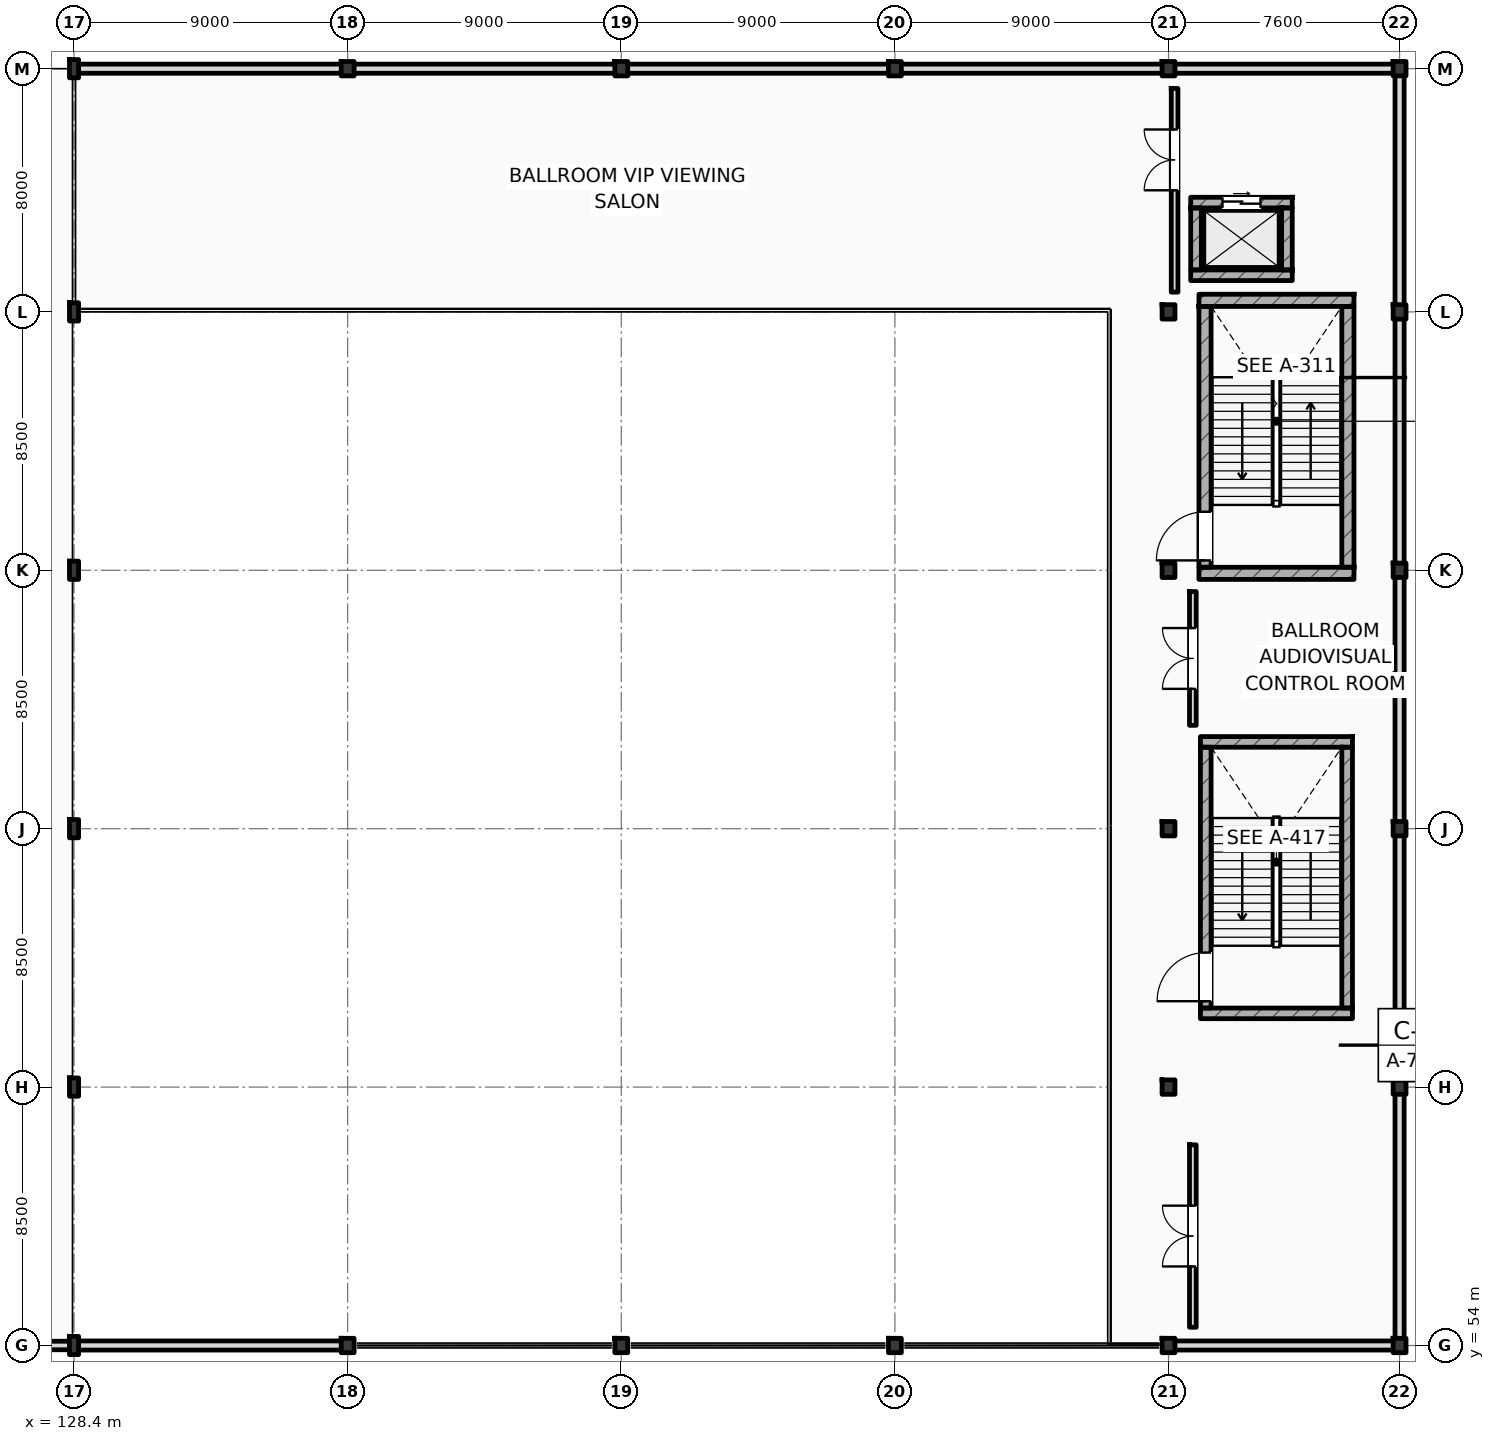
"""IFC4 building model, lengths in metres.
Left out: names, types, materials, properties, quantities, classifications, styles, units other than length and angle.
Written with IfcOpenShell. Run it as: python <this file> out.ifc"""

import sys

from ifc_helpers import new_model, si_unit, direction, frame, frame_2d, origin, origin_2d, place, context, subcontext, project, spatial, rectangle, i_section, extrude, element, fill, save


model = new_model("IFC4")
c1 = context("Model", 3, precision=1e-05, world=origin(), true_north=direction((0.0, 1.0)))
c2 = subcontext(c1, "Body", "Model", "MODEL_VIEW")
j1 = project(units=[si_unit("LENGTHUNIT", "METRE"), si_unit("PLANEANGLEUNIT", "RADIAN")], contexts=[c1])
p1 = place(None, origin())
s1 = spatial("IfcSite", under=j1, at=p1, CompositionType="ELEMENT")
p2 = place(p1, origin())
s2 = spatial("IfcBuilding", under=s1, at=p2, CompositionType="ELEMENT")
p3 = place(p2, frame((0.0, 0.0, 6.0)))
s3 = spatial("IfcBuildingStorey", under=s2, at=p3, CompositionType="ELEMENT", Elevation=6.0)
for number, where, z_axis, x_axis in (
    (1, (128.4, 54.0, 0.0), (0.0, 0.0, 1.0), (1.0, 0.0, 0.0)),
    (2, (128.4, 62.5, 0.0), (0.0, 0.0, 1.0), (1.0, 0.0, 0.0)),
    (3, (128.4, 71.0, 0.0), (0.0, 0.0, 1.0), (1.0, 0.0, 0.0)),
    (4, (128.4, 79.5, 0.0), (0.0, 0.0, 1.0), (1.0, 0.0, 0.0)),
    (5, (128.4, 88.0, 0.0), (0.0, 0.0, 1.0), (1.0, 0.0, 0.0)),
    (6, (128.4, 96.0, 0.0), (0.0, 0.0, 1.0), (1.0, 0.0, 0.0)),
):
    element("IfcColumn", number, at=place(p3, frame(where, z_axis=z_axis, x_axis=x_axis)), inside=s3, PredefinedType="COLUMN", context=c2, shape_type="SweptSolid", body=[
        extrude(i_section(OverallWidth=0.3, OverallDepth=0.6, WebThickness=0.015, FlangeThickness=0.03, FilletRadius=0.027, at=origin_2d()), origin(), (0.0, 0.0, 1.0), 5.4),
    ])
for number, where, z_axis, x_axis in (
    (7, (164.4, 54.0, 0.0), (0.0, 0.0, 1.0), (1.0, 0.0, 0.0)),
    (8, (164.4, 62.5, 0.0), (0.0, 0.0, 1.0), (1.0, 0.0, 0.0)),
    (9, (164.4, 71.0, 0.0), (0.0, 0.0, 1.0), (1.0, 0.0, 0.0)),
    (10, (164.4, 79.5, 0.0), (0.0, 0.0, 1.0), (1.0, 0.0, 0.0)),
    (11, (164.4, 88.0, 0.0), (0.0, 0.0, 1.0), (1.0, 0.0, 0.0)),
    (12, (164.4, 96.0, 0.0), (0.0, 0.0, 1.0), (1.0, 0.0, 0.0)),
    (13, (172.0, 54.0, 0.0), (0.0, 0.0, 1.0), (1.0, 0.0, 0.0)),
    (14, (172.0, 62.5, 0.0), (0.0, 0.0, 1.0), (1.0, 0.0, 0.0)),
    (15, (172.0, 71.0, 0.0), (0.0, 0.0, 1.0), (1.0, 0.0, 0.0)),
    (16, (172.0, 79.5, 0.0), (0.0, 0.0, 1.0), (1.0, 0.0, 0.0)),
    (17, (172.0, 88.0, 0.0), (0.0, 0.0, 1.0), (1.0, 0.0, 0.0)),
    (18, (172.0, 96.0, 0.0), (0.0, 0.0, 1.0), (1.0, 0.0, 0.0)),
    (19, (137.4, 54.0, 0.0), (0.0, 0.0, 1.0), (1.0, 0.0, 0.0)),
    (20, (137.4, 96.0, 0.0), (0.0, 0.0, 1.0), (1.0, 0.0, 0.0)),
    (21, (146.4, 54.0, 0.0), (0.0, 0.0, 1.0), (1.0, 0.0, 0.0)),
    (22, (146.4, 96.0, 0.0), (0.0, 0.0, 1.0), (1.0, 0.0, 0.0)),
    (23, (155.4, 54.0, 0.0), (0.0, 0.0, 1.0), (1.0, 0.0, 0.0)),
    (24, (155.4, 96.0, 0.0), (0.0, 0.0, 1.0), (1.0, 0.0, 0.0)),
):
    element("IfcColumn", number, at=place(p3, frame(where, z_axis=z_axis, x_axis=x_axis)), inside=s3, PredefinedType="COLUMN", context=c2, shape_type="SweptSolid", body=[
        extrude(i_section(OverallWidth=0.424, OverallDepth=0.474, WebThickness=0.045, FlangeThickness=0.055, FilletRadius=0.015, at=origin_2d()), origin(), (0.0, 0.0, 1.0), 5.4),
    ])
for number, where, z_axis, x_axis in (
    (25, (165.4, 88.38, 0.0), (0.0, 0.0, 1.0), (1.0, 0.0, 0.0)),
    (26, (165.4, 79.4, 0.0), (0.0, 0.0, 1.0), (1.0, 0.0, 0.0)),
):
    element("IfcWall", number, at=place(p3, frame(where, z_axis=z_axis, x_axis=x_axis)), inside=s3, PredefinedType="SHEAR", context=c2, shape_type="SweptSolid", body=[
        extrude(rectangle(XDim=5.1, YDim=0.4, at=frame_2d((2.55, 0.0))), origin(), (0.0, 0.0, 1.0), 5.4),
    ])
p4 = place(p3, frame((165.6, 79.6, 0.0), z_axis=(0.0, 0.0, 1.0), x_axis=(0.0, 1.0, 0.0)))
e27 = element("IfcWall", 27, at=p4, inside=s3, PredefinedType="SHEAR", context=c2, shape_type="SweptSolid", body=[
    extrude(rectangle(XDim=8.58, YDim=0.4, at=frame_2d((4.29, 0.0))), origin(), (0.0, 0.0, 1.0), 5.4),
])
p5 = place(p4, frame((0.225, 0.0, 0.0)))
e28 = element("IfcOpeningElement", 28, at=p5, cuts=e27, PredefinedType="OPENING", context=c2, shape_type="SweptSolid", body=[
    extrude(rectangle(XDim=1.6, YDim=2.2, at=frame_2d((0.8, 1.1))), frame((0.0, 0.21, 0.0), z_axis=(0.0, -1.0, 0.0), x_axis=(1.0, 0.0, 0.0)), (0.0, 0.0, 1.0), 0.42),
])
p6 = place(p3, frame((170.3, 79.6, 0.0), z_axis=(0.0, 0.0, 1.0), x_axis=(0.0, 1.0, 0.0)))
e29 = element("IfcWall", 29, at=p6, inside=s3, PredefinedType="SHEAR", context=c2, shape_type="SweptSolid", body=[
    extrude(rectangle(XDim=8.58, YDim=0.4, at=frame_2d((4.29, 0.0))), origin(), (0.0, 0.0, 1.0), 5.4),
])
for number, where, z_axis, x_axis in (
    (30, (165.45, 73.855, 0.0), (0.0, 0.0, 1.0), (1.0, 0.0, 0.0)),
    (31, (165.45, 64.925, 0.0), (0.0, 0.0, 1.0), (1.0, 0.0, 0.0)),
):
    element("IfcWall", number, at=place(p3, frame(where, z_axis=z_axis, x_axis=x_axis)), inside=s3, PredefinedType="SHEAR", context=c2, shape_type="SweptSolid", body=[
        extrude(rectangle(XDim=5.0, YDim=0.35, at=frame_2d((2.5, 0.0))), origin(), (0.0, 0.0, 1.0), 5.4),
    ])
p7 = place(p3, frame((165.625, 65.1, 0.0), z_axis=(0.0, 0.0, 1.0), x_axis=(0.0, 1.0, 0.0)))
e32 = element("IfcWall", 32, at=p7, inside=s3, PredefinedType="SHEAR", context=c2, shape_type="SweptSolid", body=[
    extrude(rectangle(XDim=8.58, YDim=0.35, at=frame_2d((4.29, 0.0))), origin(), (0.0, 0.0, 1.0), 5.4),
])
p8 = place(p7, frame((0.225, 0.0, 0.0)))
e33 = element("IfcOpeningElement", 33, at=p8, cuts=e32, PredefinedType="OPENING", context=c2, shape_type="SweptSolid", body=[
    extrude(rectangle(XDim=1.6, YDim=2.2, at=frame_2d((0.8, 1.1))), frame((0.0, 0.185, 0.0), z_axis=(0.0, -1.0, 0.0), x_axis=(1.0, 0.0, 0.0)), (0.0, 0.0, 1.0), 0.37),
])
p9 = place(p3, frame((170.275, 65.1, 0.0), z_axis=(0.0, 0.0, 1.0), x_axis=(0.0, 1.0, 0.0)))
e34 = element("IfcWall", 34, at=p9, inside=s3, PredefinedType="SHEAR", context=c2, shape_type="SweptSolid", body=[
    extrude(rectangle(XDim=8.58, YDim=0.35, at=frame_2d((4.29, 0.0))), origin(), (0.0, 0.0, 1.0), 5.4),
])
p10 = place(p3, frame((103.2, 54.0, 0.0), z_axis=(0.0, 0.0, 1.0), x_axis=(1.0, 0.0, 0.0)))
e35 = element("IfcWall", 35, at=p10, inside=s3, PredefinedType="STANDARD", context=c2, shape_type="SweptSolid", body=[
    extrude(rectangle(XDim=25.2, YDim=0.28, at=frame_2d((12.6, 0.0))), origin(), (0.0, 0.0, 1.0), 4.49),
])
p11 = place(p3, frame((128.4, 54.0, 0.0), z_axis=(0.0, 0.0, 1.0), x_axis=(1.0, 0.0, 0.0)))
e36 = element("IfcWall", 36, at=p11, inside=s3, PredefinedType="STANDARD", context=c2, shape_type="SweptSolid", body=[
    extrude(rectangle(XDim=9.0, YDim=0.3, at=frame_2d((4.5, 0.0))), origin(), (0.0, 0.0, 1.0), 4.44),
])
for number, where, z_axis, x_axis in (
    (37, (128.4, 96.0, 0.0), (0.0, 0.0, 1.0), (1.0, 0.0, 0.0)),
    (38, (137.4, 96.0, 0.0), (0.0, 0.0, 1.0), (1.0, 0.0, 0.0)),
    (39, (146.4, 96.0, 0.0), (0.0, 0.0, 1.0), (1.0, 0.0, 0.0)),
    (40, (155.4, 96.0, 0.0), (0.0, 0.0, 1.0), (1.0, 0.0, 0.0)),
):
    element("IfcWall", number, at=place(p3, frame(where, z_axis=z_axis, x_axis=x_axis)), inside=s3, PredefinedType="STANDARD", context=c2, shape_type="SweptSolid", body=[
        extrude(rectangle(XDim=9.0, YDim=0.3, at=frame_2d((4.5, 0.0))), origin(), (0.0, 0.0, 1.0), 4.57),
    ])
p12 = place(p3, frame((164.4, 54.0, 0.0), z_axis=(0.0, 0.0, 1.0), x_axis=(1.0, 0.0, 0.0)))
e41 = element("IfcWall", 41, at=p12, inside=s3, PredefinedType="STANDARD", context=c2, shape_type="SweptSolid", body=[
    extrude(rectangle(XDim=7.6, YDim=0.3, at=frame_2d((3.8, 0.0))), origin(), (0.0, 0.0, 1.0), 4.54),
])
p13 = place(p3, frame((164.4, 96.0, 0.0), z_axis=(0.0, 0.0, 1.0), x_axis=(1.0, 0.0, 0.0)))
e42 = element("IfcWall", 42, at=p13, inside=s3, PredefinedType="STANDARD", context=c2, shape_type="SweptSolid", body=[
    extrude(rectangle(XDim=7.6, YDim=0.3, at=frame_2d((3.8, 0.0))), origin(), (0.0, 0.0, 1.0), 4.67),
])
p14 = place(p3, frame((172.0, 54.0, 0.0), z_axis=(0.0, 0.0, 1.0), x_axis=(0.0, 1.0, 0.0)))
e43 = element("IfcWall", 43, at=p14, inside=s3, PredefinedType="STANDARD", context=c2, shape_type="SweptSolid", body=[
    extrude(rectangle(XDim=17.0, YDim=0.3, at=frame_2d((8.5, 0.0))), origin(), (0.0, 0.0, 1.0), 4.58),
])
for number, where, z_axis, x_axis in (
    (44, (172.0, 71.0, 0.0), (0.0, 0.0, 1.0), (0.0, 1.0, 0.0)),
    (45, (172.0, 79.5, 0.0), (0.0, 0.0, 1.0), (0.0, 1.0, 0.0)),
):
    element("IfcWall", number, at=place(p3, frame(where, z_axis=z_axis, x_axis=x_axis)), inside=s3, PredefinedType="STANDARD", context=c2, shape_type="SweptSolid", body=[
        extrude(rectangle(XDim=8.5, YDim=0.3, at=frame_2d((4.25, 0.0))), origin(), (0.0, 0.0, 1.0), 4.68),
    ])
p15 = place(p3, frame((172.0, 88.0, 0.0), z_axis=(0.0, 0.0, 1.0), x_axis=(0.0, 1.0, 0.0)))
e46 = element("IfcWall", 46, at=p15, inside=s3, PredefinedType="STANDARD", context=c2, shape_type="SweptSolid", body=[
    extrude(rectangle(XDim=8.0, YDim=0.3, at=frame_2d((4.0, 0.0))), origin(), (0.0, 0.0, 1.0), 4.72),
])
p16 = place(p3, frame((165.13, 91.595, 0.0), z_axis=(0.0, 0.0, 1.0), x_axis=(1.0, 0.0, 0.0)))
e47 = element("IfcWall", 47, at=p16, inside=s3, PredefinedType="SHEAR", context=c2, shape_type="SweptSolid", body=[
    extrude(rectangle(XDim=3.34, YDim=0.35, at=frame_2d((1.67, 0.0))), origin(), (0.0, 0.0, 1.0), 5.05),
])
p17 = place(p16, frame((1.045, 0.0, 0.0)))
e48 = element("IfcOpeningElement", 48, at=p17, cuts=e47, PredefinedType="OPENING", context=c2, shape_type="SweptSolid", body=[
    extrude(rectangle(XDim=1.25, YDim=2.25, at=frame_2d((0.625, 1.125))), frame((0.0, 0.185, 0.0), z_axis=(0.0, -1.0, 0.0), x_axis=(1.0, 0.0, 0.0)), (0.0, 0.0, 1.0), 0.37),
])
p18 = place(p3, frame((165.13, 89.205, 0.0), z_axis=(0.0, 0.0, 1.0), x_axis=(1.0, 0.0, 0.0)))
e49 = element("IfcWall", 49, at=p18, inside=s3, PredefinedType="SHEAR", context=c2, shape_type="SweptSolid", body=[
    extrude(rectangle(XDim=3.34, YDim=0.35, at=frame_2d((1.67, 0.0))), origin(), (0.0, 0.0, 1.0), 5.05),
])
for number, where, z_axis, x_axis in (
    (50, (165.305, 89.38, 0.0), (0.0, 0.0, 1.0), (0.0, 1.0, 0.0)),
    (51, (168.295, 89.38, 0.0), (0.0, 0.0, 1.0), (0.0, 1.0, 0.0)),
):
    element("IfcWall", number, at=place(p3, frame(where, z_axis=z_axis, x_axis=x_axis)), inside=s3, PredefinedType="SHEAR", context=c2, shape_type="SweptSolid", body=[
        extrude(rectangle(XDim=2.04, YDim=0.35, at=frame_2d((1.02, 0.0))), origin(), (0.0, 0.0, 1.0), 5.05),
    ])
p19 = place(p3, frame((164.6, 88.65, 0.0), z_axis=(0.0, 0.0, 1.0), x_axis=(0.0, 1.0, 0.0)))
e52 = element("IfcWall", 52, at=p19, inside=s3, PredefinedType="PARTITIONING", context=c2, shape_type="SweptSolid", body=[
    extrude(rectangle(XDim=6.7, YDim=0.22, at=frame_2d((3.35, 0.0))), origin(), (0.0, 0.0, 1.0), 4.72),
])
p20 = place(p19, frame((3.35, 0.0, 0.0)))
e53 = element("IfcOpeningElement", 53, at=p20, cuts=e52, PredefinedType="OPENING", context=c2, shape_type="SweptSolid", body=[
    extrude(rectangle(XDim=2.0, YDim=2.35, at=frame_2d((1.0, 1.175))), frame((0.0, 0.12, 0.0), z_axis=(0.0, -1.0, 0.0), x_axis=(1.0, 0.0, 0.0)), (0.0, 0.0, 1.0), 0.24),
])
p21 = place(p3, frame((165.2, 74.4, 0.0), z_axis=(0.0, 0.0, 1.0), x_axis=(0.0, 1.0, 0.0)))
e54 = element("IfcWall", 54, at=p21, inside=s3, PredefinedType="PARTITIONING", context=c2, shape_type="SweptSolid", body=[
    extrude(rectangle(XDim=4.4, YDim=0.22, at=frame_2d((2.2, 0.0))), origin(), (0.0, 0.0, 1.0), 5.05),
])
p22 = place(p21, frame((1.2, 0.0, 0.0)))
e55 = element("IfcOpeningElement", 55, at=p22, cuts=e54, PredefinedType="OPENING", context=c2, shape_type="SweptSolid", body=[
    extrude(rectangle(XDim=2.0, YDim=2.35, at=frame_2d((1.0, 1.175))), frame((0.0, 0.12, 0.0), z_axis=(0.0, -1.0, 0.0), x_axis=(1.0, 0.0, 0.0)), (0.0, 0.0, 1.0), 0.24),
])
p23 = place(p3, frame((165.2, 54.6, 0.0), z_axis=(0.0, 0.0, 1.0), x_axis=(0.0, 1.0, 0.0)))
e56 = element("IfcWall", 56, at=p23, inside=s3, PredefinedType="PARTITIONING", context=c2, shape_type="SweptSolid", body=[
    extrude(rectangle(XDim=6.0, YDim=0.22, at=frame_2d((3.0, 0.0))), origin(), (0.0, 0.0, 1.0), 5.05),
])
p24 = place(p23, frame((2.0, 0.0, 0.0)))
e57 = element("IfcOpeningElement", 57, at=p24, cuts=e56, PredefinedType="OPENING", context=c2, shape_type="SweptSolid", body=[
    extrude(rectangle(XDim=2.0, YDim=2.35, at=frame_2d((1.0, 1.175))), frame((0.0, 0.12, 0.0), z_axis=(0.0, -1.0, 0.0), x_axis=(1.0, 0.0, 0.0)), (0.0, 0.0, 1.0), 0.24),
])
p25 = place(p5, origin())
e58 = element("IfcDoor", 58, at=p25, inside=s3, OperationType="SINGLE_SWING_LEFT", PredefinedType="DOOR", context=c2, shape_type="SweptSolid", body=[
    extrude(rectangle(XDim=1.6, YDim=2.2, at=frame_2d((0.8, 1.1))), frame((0.0, 0.025, 0.0), z_axis=(0.0, -1.0, 0.0), x_axis=(1.0, 0.0, 0.0)), (0.0, 0.0, 1.0), 0.05),
])
fill(e28, e58)
p26 = place(p8, origin())
e59 = element("IfcDoor", 59, at=p26, inside=s3, OperationType="SINGLE_SWING_LEFT", PredefinedType="DOOR", context=c2, shape_type="SweptSolid", body=[
    extrude(rectangle(XDim=1.6, YDim=2.2, at=frame_2d((0.8, 1.1))), frame((0.0, 0.025, 0.0), z_axis=(0.0, -1.0, 0.0), x_axis=(1.0, 0.0, 0.0)), (0.0, 0.0, 1.0), 0.05),
])
fill(e33, e59)
p27 = place(p17, origin())
e60 = element("IfcDoor", 60, at=p27, inside=s3, OperationType="SLIDING_TO_LEFT", PredefinedType="DOOR", context=c2, shape_type="SweptSolid", body=[
    extrude(rectangle(XDim=1.25, YDim=2.25, at=frame_2d((0.625, 1.125))), frame((0.0, 0.025, 0.0), z_axis=(0.0, -1.0, 0.0), x_axis=(1.0, 0.0, 0.0)), (0.0, 0.0, 1.0), 0.05),
])
fill(e48, e60)
p28 = place(p20, origin())
e61 = element("IfcDoor", 61, at=p28, inside=s3, OperationType="DOUBLE_SWING_LEFT", PredefinedType="DOOR", context=c2, shape_type="SweptSolid", body=[
    extrude(rectangle(XDim=2.0, YDim=2.35, at=frame_2d((1.0, 1.175))), frame((0.0, 0.025, 0.0), z_axis=(0.0, -1.0, 0.0), x_axis=(1.0, 0.0, 0.0)), (0.0, 0.0, 1.0), 0.05),
])
fill(e53, e61)
p29 = place(p22, origin())
e62 = element("IfcDoor", 62, at=p29, inside=s3, OperationType="DOUBLE_SWING_LEFT", PredefinedType="DOOR", context=c2, shape_type="SweptSolid", body=[
    extrude(rectangle(XDim=2.0, YDim=2.35, at=frame_2d((1.0, 1.175))), frame((0.0, 0.025, 0.0), z_axis=(0.0, -1.0, 0.0), x_axis=(1.0, 0.0, 0.0)), (0.0, 0.0, 1.0), 0.05),
])
fill(e55, e62)
p30 = place(p24, origin())
e63 = element("IfcDoor", 63, at=p30, inside=s3, OperationType="DOUBLE_SWING_LEFT", PredefinedType="DOOR", context=c2, shape_type="SweptSolid", body=[
    extrude(rectangle(XDim=2.0, YDim=2.35, at=frame_2d((1.0, 1.175))), frame((0.0, 0.025, 0.0), z_axis=(0.0, -1.0, 0.0), x_axis=(1.0, 0.0, 0.0)), (0.0, 0.0, 1.0), 0.05),
])
fill(e57, e63)
save(model, sys.argv[1])
